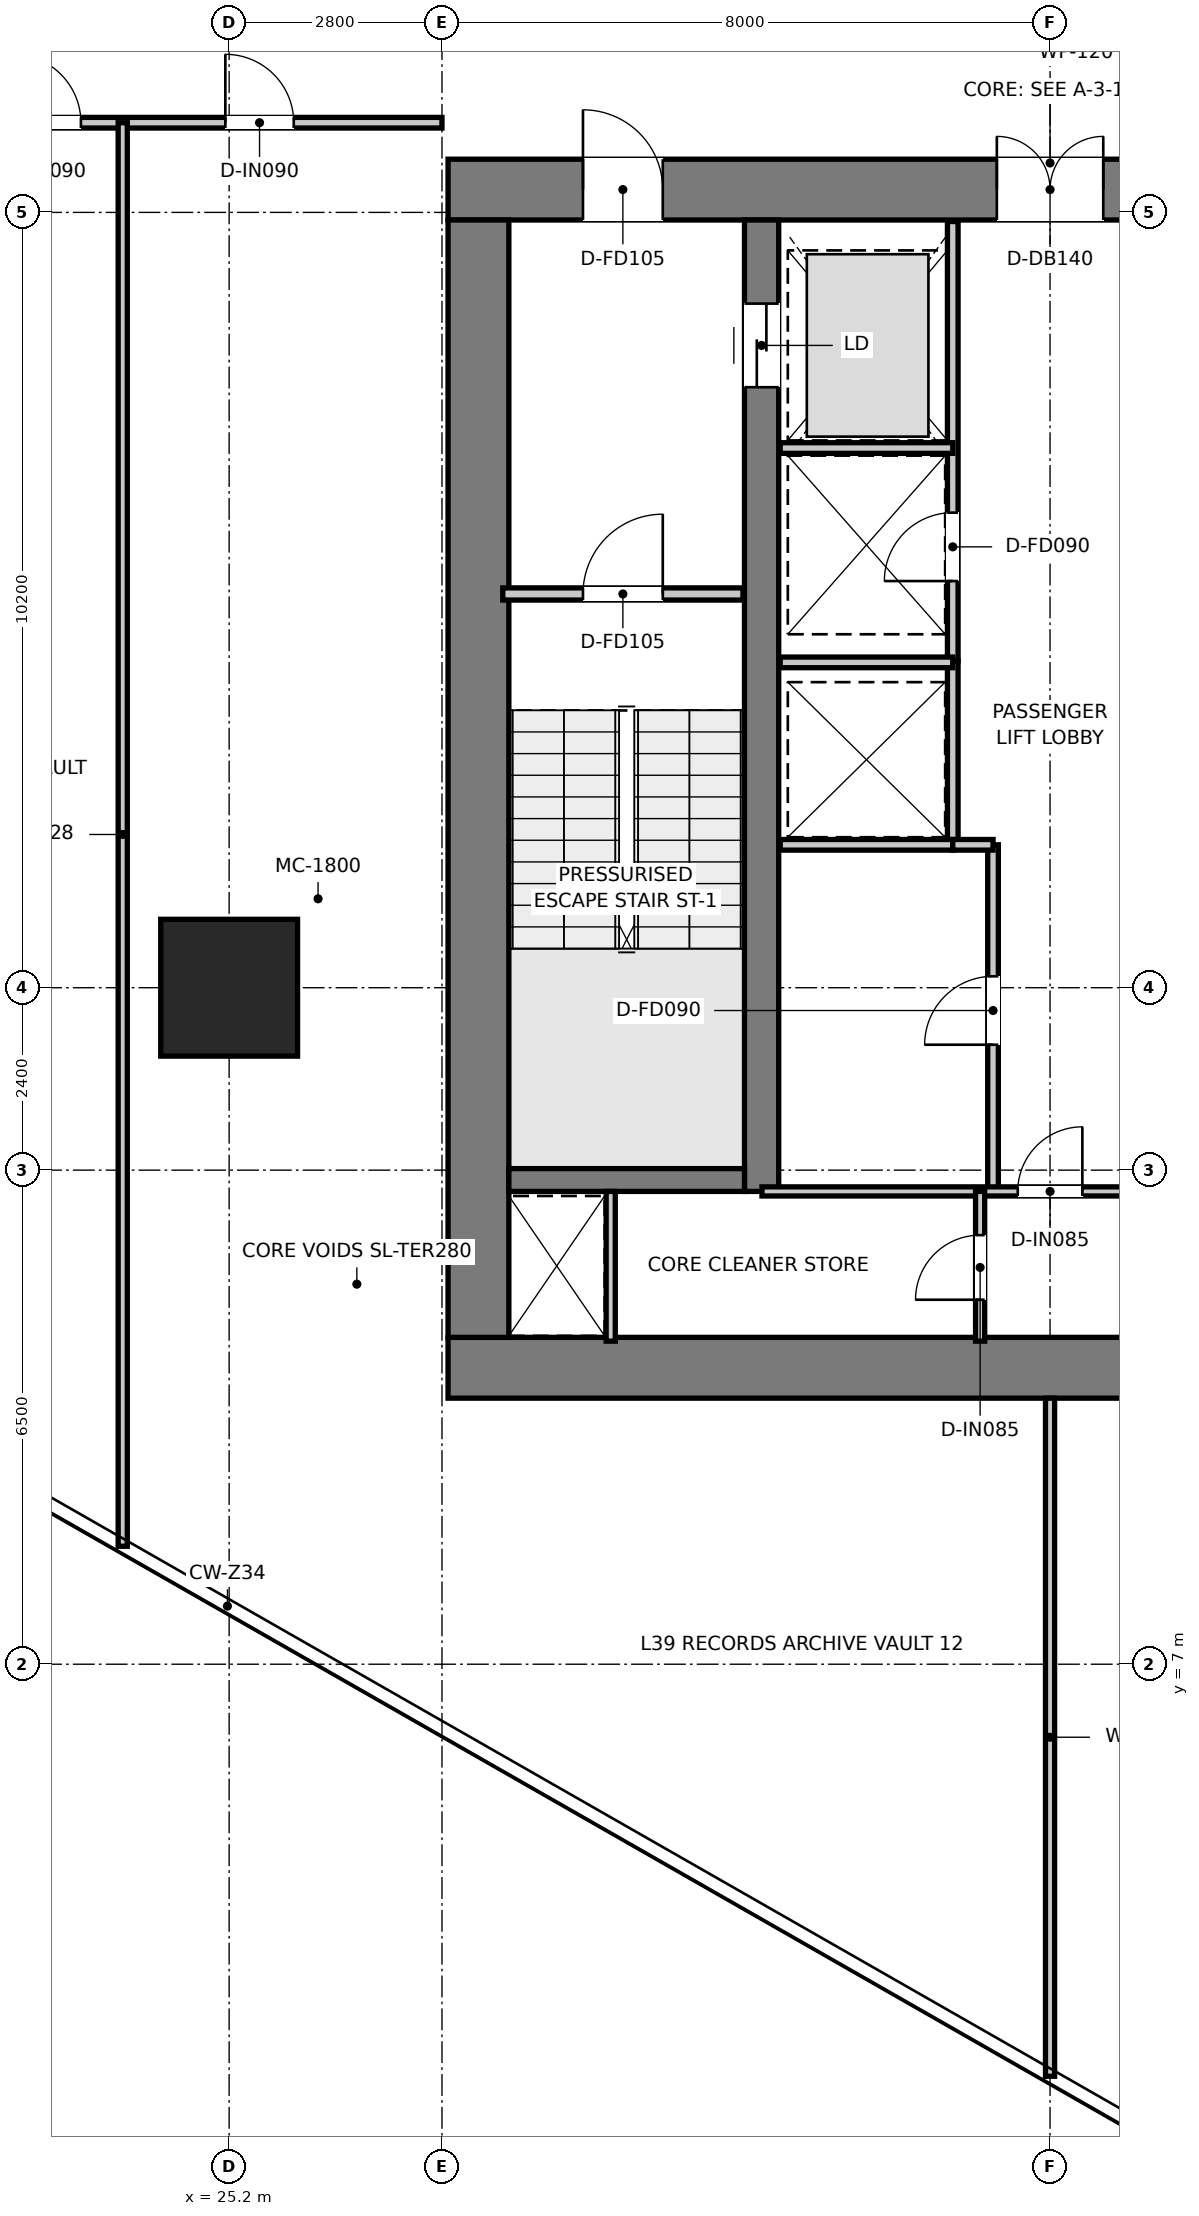
"""IFC4 building model, lengths in metres.
Left out: names, types, materials, properties, quantities, classifications, styles, units other than length and angle.
Written with IfcOpenShell. Run it as: python <this file> out.ifc"""

import sys

from ifc_helpers import new_model, si_unit, direction, frame, frame_2d, origin, origin_2d, place, context, subcontext, project, spatial, rectangle, extrude, source, transform, mapped, element, fill, save


model = new_model("IFC4")
c1 = context("Model", 3, precision=1e-05, world=origin(), true_north=direction((0.0, 1.0)))
c2 = subcontext(c1, "Body", "Model", "MODEL_VIEW")
j1 = project(units=[si_unit("LENGTHUNIT", "METRE"), si_unit("PLANEANGLEUNIT", "RADIAN")], contexts=[c1])
p1 = place(None, origin())
s1 = spatial("IfcSite", under=j1, at=p1, CompositionType="ELEMENT")
p2 = place(p1, origin())
s2 = spatial("IfcBuilding", under=s1, at=p2, CompositionType="ELEMENT")
p3 = place(p2, frame((0.0, 0.0, 162.0)))
s3 = spatial("IfcBuildingStorey", under=s2, at=p3, CompositionType="ELEMENT", Elevation=162.0)
p4 = place(p3, frame((28.08, 10.9, 0.0), z_axis=(0.0, 0.0, 1.0), x_axis=(1.0, 0.0, 0.0)))
e1 = element("IfcWall", 1, at=p4, inside=s3, PredefinedType="SHEAR", context=c2, shape_type="SweptSolid", body=[
    extrude(rectangle(XDim=15.84, YDim=0.8, at=frame_2d((7.92, 0.0))), origin(), (0.0, 0.0, 1.0), 3.95),
])
p5 = place(p3, frame((28.08, 26.4, 0.0), z_axis=(0.0, 0.0, 1.0), x_axis=(1.0, 0.0, 0.0)))
e2 = element("IfcWall", 2, at=p5, inside=s3, PredefinedType="SHEAR", context=c2, shape_type="SweptSolid", body=[
    extrude(rectangle(XDim=15.84, YDim=0.8, at=frame_2d((7.92, 0.0))), origin(), (0.0, 0.0, 1.0), 3.95),
])
p6 = place(p5, frame((7.22, 0.0, 0.0)))
e3 = element("IfcOpeningElement", 3, at=p6, cuts=e2, PredefinedType="OPENING", context=c2, shape_type="SweptSolid", body=[
    extrude(rectangle(XDim=1.4, YDim=2.2, at=frame_2d((0.7, 1.1))), frame((0.0, 0.41, 0.0), z_axis=(0.0, -1.0, 0.0), x_axis=(1.0, 0.0, 0.0)), (0.0, 0.0, 1.0), 0.82),
])
p7 = place(p5, frame((1.775, 0.0, 0.0)))
e4 = element("IfcOpeningElement", 4, at=p7, cuts=e2, PredefinedType="OPENING", context=c2, shape_type="SweptSolid", body=[
    extrude(rectangle(XDim=1.05, YDim=2.1, at=frame_2d((0.525, 1.05))), frame((0.0, 0.41, 0.0), z_axis=(0.0, -1.0, 0.0), x_axis=(1.0, 0.0, 0.0)), (0.0, 0.0, 1.0), 0.82),
])
p8 = place(p5, frame((13.015, 0.0, 0.0)))
e5 = element("IfcOpeningElement", 5, at=p8, cuts=e2, PredefinedType="OPENING", context=c2, shape_type="SweptSolid", body=[
    extrude(rectangle(XDim=1.05, YDim=2.1, at=frame_2d((0.525, 1.05))), frame((0.0, 0.41, 0.0), z_axis=(0.0, -1.0, 0.0), x_axis=(1.0, 0.0, 0.0)), (0.0, 0.0, 1.0), 0.82),
])
p9 = place(p3, frame((28.48, 11.3, 0.0), z_axis=(0.0, 0.0, 1.0), x_axis=(0.0, 1.0, 0.0)))
e6 = element("IfcWall", 6, at=p9, inside=s3, PredefinedType="SHEAR", context=c2, shape_type="SweptSolid", body=[
    extrude(rectangle(XDim=14.7, YDim=0.8, at=frame_2d((7.35, 0.0))), origin(), (0.0, 0.0, 1.0), 3.95),
])
p10 = place(p3, frame((32.205, 13.22, 0.0), z_axis=(0.0, 0.0, 1.0), x_axis=(0.0, 1.0, 0.0)))
e7 = element("IfcWall", 7, at=p10, inside=s3, PredefinedType="SHEAR", context=c2, shape_type="SweptSolid", body=[
    extrude(rectangle(XDim=12.78, YDim=0.45, at=frame_2d((6.39, 0.0))), origin(), (0.0, 0.0, 1.0), 3.95),
])
p11 = place(p10, frame((10.58, 0.0, 0.0)))
e8 = element("IfcOpeningElement", 8, at=p11, cuts=e7, PredefinedType="OPENING", context=c2, shape_type="SweptSolid", body=[
    extrude(rectangle(XDim=1.1, YDim=2.15, at=frame_2d((0.55, 1.075))), frame((0.0, 0.235, 0.0), z_axis=(0.0, -1.0, 0.0), x_axis=(1.0, 0.0, 0.0)), (0.0, 0.0, 1.0), 0.47),
])
p12 = place(p3, frame((28.88, 13.37, 0.0), z_axis=(0.0, 0.0, 1.0), x_axis=(1.0, 0.0, 0.0)))
e9 = element("IfcWall", 9, at=p12, inside=s3, PredefinedType="SHEAR", context=c2, shape_type="SweptSolid", body=[
    extrude(rectangle(XDim=3.1, YDim=0.3, at=frame_2d((1.55, 0.0))), origin(), (0.0, 0.0, 1.0), 3.95),
])
m1 = source(origin(), c2, "Body", "SweptSolid", [
    extrude(rectangle(XDim=1.8, YDim=1.8, at=origin_2d()), origin(), (0.0, 0.0, 1.0), 3.95),
])
p13 = place(p3, frame((25.2, 15.9, 0.0), z_axis=(0.0, 0.0, 1.0), x_axis=(1.0, 0.0, 0.0)))
e10 = element("IfcColumn", 10, at=p13, inside=s3, PredefinedType="USERDEFINED", context=c2, shape_type="MappedRepresentation", body=[
    mapped(m1, transform((0.0, 0.0, 0.0), x_axis=(1.0, 0.0, 0.0), y_axis=(0.0, 1.0, 0.0), z_axis=(0.0, 0.0, 1.0), scale=1.0)),
])
p14 = place(p3, frame((28.8, 21.08, 0.0), z_axis=(0.0, 0.0, 1.0), x_axis=(1.0, 0.0, 0.0)))
e11 = element("IfcWall", 11, at=p14, inside=s3, PredefinedType="PARTITIONING", context=c2, shape_type="SweptSolid", body=[
    extrude(rectangle(XDim=3.16, YDim=0.16, at=frame_2d((1.58, 0.0))), origin(), (0.0, 0.0, 1.0), 3.67),
])
p15 = place(p14, frame((1.055, 0.0, 0.0)))
e12 = element("IfcOpeningElement", 12, at=p15, cuts=e11, PredefinedType="OPENING", context=c2, shape_type="SweptSolid", body=[
    extrude(rectangle(XDim=1.05, YDim=2.1, at=frame_2d((0.525, 1.05))), frame((0.0, 0.09, 0.0), z_axis=(0.0, -1.0, 0.0), x_axis=(1.0, 0.0, 0.0)), (0.0, 0.0, 1.0), 0.18),
])
p16 = place(p3, frame((34.72, 20.2, 0.0), z_axis=(0.0, 0.0, 1.0), x_axis=(0.0, 1.0, 0.0)))
e13 = element("IfcWall", 13, at=p16, inside=s3, PredefinedType="PARTITIONING", context=c2, shape_type="SweptSolid", body=[
    extrude(rectangle(XDim=5.78, YDim=0.14, at=frame_2d((2.89, 0.0))), origin(), (0.0, 0.0, 1.0), 2.67),
])
p17 = place(p16, frame((1.05, 0.0, 0.0)))
e14 = element("IfcOpeningElement", 14, at=p17, cuts=e13, PredefinedType="OPENING", context=c2, shape_type="SweptSolid", body=[
    extrude(rectangle(XDim=0.9, YDim=2.1, at=frame_2d((0.45, 1.05))), frame((0.0, 0.08, 0.0), z_axis=(0.0, -1.0, 0.0), x_axis=(1.0, 0.0, 0.0)), (0.0, 0.0, 1.0), 0.16),
])
p18 = place(p3, frame((32.45, 23.0, 0.0), z_axis=(0.0, 0.0, 1.0), x_axis=(1.0, 0.0, 0.0)))
e15 = element("IfcWall", 15, at=p18, inside=s3, PredefinedType="PARTITIONING", context=c2, shape_type="SweptSolid", body=[
    extrude(rectangle(XDim=2.27, YDim=0.14, at=frame_2d((1.135, 0.0))), origin(), (0.0, 0.0, 1.0), 2.67),
])
p19 = place(p3, frame((34.72, 17.78, 0.0), z_axis=(0.0, 0.0, 1.0), x_axis=(0.0, 1.0, 0.0)))
e16 = element("IfcWall", 16, at=p19, inside=s3, PredefinedType="PARTITIONING", context=c2, shape_type="SweptSolid", body=[
    extrude(rectangle(XDim=2.42, YDim=0.14, at=frame_2d((1.21, 0.0))), origin(), (0.0, 0.0, 1.0), 3.67),
])
for number, where, z_axis, x_axis in (
    (17, (32.45, 17.78, 0.0), (0.0, 0.0, 1.0), (1.0, 0.0, 0.0)),
    (18, (32.45, 20.18, 0.0), (0.0, 0.0, 1.0), (1.0, 0.0, 0.0)),
):
    element("IfcWall", number, at=place(p3, frame(where, z_axis=z_axis, x_axis=x_axis)), inside=s3, PredefinedType="PARTITIONING", context=c2, shape_type="SweptSolid", body=[
        extrude(rectangle(XDim=2.27, YDim=0.14, at=frame_2d((1.135, 0.0))), origin(), (0.0, 0.0, 1.0), 3.67),
    ])
p20 = place(p3, frame((35.25, 13.22, 0.0), z_axis=(0.0, 0.0, 1.0), x_axis=(0.0, 1.0, 0.0)))
e19 = element("IfcWall", 19, at=p20, inside=s3, PredefinedType="PARTITIONING", context=c2, shape_type="SweptSolid", body=[
    extrude(rectangle(XDim=4.56, YDim=0.14, at=frame_2d((2.28, 0.0))), origin(), (0.0, 0.0, 1.0), 3.67),
])
p21 = place(p20, frame((1.93, 0.0, 0.0)))
e20 = element("IfcOpeningElement", 20, at=p21, cuts=e19, PredefinedType="OPENING", context=c2, shape_type="SweptSolid", body=[
    extrude(rectangle(XDim=0.9, YDim=2.1, at=frame_2d((0.45, 1.05))), frame((0.0, 0.08, 0.0), z_axis=(0.0, -1.0, 0.0), x_axis=(1.0, 0.0, 0.0)), (0.0, 0.0, 1.0), 0.16),
])
p22 = place(p3, frame((34.72, 17.78, 0.0), z_axis=(0.0, 0.0, 1.0), x_axis=(1.0, 0.0, 0.0)))
e21 = element("IfcWall", 21, at=p22, inside=s3, PredefinedType="PARTITIONING", context=c2, shape_type="SweptSolid", body=[
    extrude(rectangle(XDim=0.53, YDim=0.14, at=frame_2d((0.265, 0.0))), origin(), (0.0, 0.0, 1.0), 3.67),
])
p23 = place(p3, frame((30.22, 11.25, 0.0), z_axis=(0.0, 0.0, 1.0), x_axis=(0.0, 1.0, 0.0)))
e22 = element("IfcWall", 22, at=p23, inside=s3, PredefinedType="PARTITIONING", context=c2, shape_type="SweptSolid", body=[
    extrude(rectangle(XDim=1.97, YDim=0.12, at=frame_2d((0.985, 0.0))), origin(), (0.0, 0.0, 1.0), 3.67),
])
p24 = place(p3, frame((32.21, 13.22, 0.0), z_axis=(0.0, 0.0, 1.0), x_axis=(1.0, 0.0, 0.0)))
e23 = element("IfcWall", 23, at=p24, inside=s3, PredefinedType="PARTITIONING", context=c2, shape_type="SweptSolid", body=[
    extrude(rectangle(XDim=7.58, YDim=0.12, at=frame_2d((3.79, 0.0))), origin(), (0.0, 0.0, 1.0), 3.67),
])
p25 = place(p24, frame((3.365, 0.0, 0.0)))
e24 = element("IfcOpeningElement", 24, at=p25, cuts=e23, PredefinedType="OPENING", context=c2, shape_type="SweptSolid", body=[
    extrude(rectangle(XDim=0.85, YDim=2.1, at=frame_2d((0.425, 1.05))), frame((0.0, 0.07, 0.0), z_axis=(0.0, -1.0, 0.0), x_axis=(1.0, 0.0, 0.0)), (0.0, 0.0, 1.0), 0.14),
])
p26 = place(p3, frame((35.08, 11.25, 0.0), z_axis=(0.0, 0.0, 1.0), x_axis=(0.0, 1.0, 0.0)))
e25 = element("IfcWall", 25, at=p26, inside=s3, PredefinedType="PARTITIONING", context=c2, shape_type="SweptSolid", body=[
    extrude(rectangle(XDim=1.97, YDim=0.12, at=frame_2d((0.985, 0.0))), origin(), (0.0, 0.0, 1.0), 3.67),
])
p27 = place(p26, frame((0.545, 0.0, 0.0)))
e26 = element("IfcOpeningElement", 26, at=p27, cuts=e25, PredefinedType="OPENING", context=c2, shape_type="SweptSolid", body=[
    extrude(rectangle(XDim=0.85, YDim=2.1, at=frame_2d((0.425, 1.05))), frame((0.0, 0.07, 0.0), z_axis=(0.0, -1.0, 0.0), x_axis=(1.0, 0.0, 0.0)), (0.0, 0.0, 1.0), 0.14),
])
p28 = place(p3, frame((11.21, 27.28, 0.0), z_axis=(0.0, 0.0, 1.0), x_axis=(1.0, 0.0, 0.0)))
e27 = element("IfcWall", 27, at=p28, inside=s3, PredefinedType="PARTITIONING", context=c2, shape_type="SweptSolid", body=[
    extrude(rectangle(XDim=16.79, YDim=0.14, at=frame_2d((8.395, 0.0))), origin(), (0.0, 0.0, 1.0), 3.03),
])
p29 = place(p28, frame((2.565, 0.0, 0.0)))
e28 = element("IfcOpeningElement", 28, at=p29, cuts=e27, PredefinedType="OPENING", context=c2, shape_type="SweptSolid", body=[
    extrude(rectangle(XDim=0.9, YDim=2.1, at=frame_2d((0.45, 1.05))), frame((0.0, 0.08, 0.0), z_axis=(0.0, -1.0, 0.0), x_axis=(1.0, 0.0, 0.0)), (0.0, 0.0, 1.0), 0.16),
])
p30 = place(p28, frame((11.139, 0.0, 0.0)))
e29 = element("IfcOpeningElement", 29, at=p30, cuts=e27, PredefinedType="OPENING", context=c2, shape_type="SweptSolid", body=[
    extrude(rectangle(XDim=0.9, YDim=2.1, at=frame_2d((0.45, 1.05))), frame((0.0, 0.08, 0.0), z_axis=(0.0, -1.0, 0.0), x_axis=(1.0, 0.0, 0.0)), (0.0, 0.0, 1.0), 0.16),
])
p31 = place(p28, frame((13.939, 0.0, 0.0)))
e30 = element("IfcOpeningElement", 30, at=p31, cuts=e27, PredefinedType="OPENING", context=c2, shape_type="SweptSolid", body=[
    extrude(rectangle(XDim=0.9, YDim=2.1, at=frame_2d((0.45, 1.05))), frame((0.0, 0.08, 0.0), z_axis=(0.0, -1.0, 0.0), x_axis=(1.0, 0.0, 0.0)), (0.0, 0.0, 1.0), 0.16),
])
p32 = place(p3, frame((36.0, 1.579, 0.0), z_axis=(0.0, 0.0, 1.0), x_axis=(0.0, 1.0, 0.0)))
e31 = element("IfcWall", 31, at=p32, inside=s3, PredefinedType="PARTITIONING", context=c2, shape_type="SweptSolid", body=[
    extrude(rectangle(XDim=8.921, YDim=0.12, at=frame_2d((4.46, 0.0))), origin(), (0.0, 0.0, 1.0), 3.67),
])
p33 = place(p3, frame((23.8, 8.552, 0.0), z_axis=(0.0, 0.0, 1.0), x_axis=(0.0, 1.0, 0.0)))
e32 = element("IfcWall", 32, at=p33, inside=s3, PredefinedType="PARTITIONING", context=c2, shape_type="SweptSolid", body=[
    extrude(rectangle(XDim=18.728, YDim=0.12, at=frame_2d((9.364, 0.0))), origin(), (0.0, 0.0, 1.0), 3.08),
])
p34 = place(p15, origin())
e33 = element("IfcDoor", 33, at=p34, inside=s3, OperationType="SINGLE_SWING_RIGHT", PredefinedType="DOOR", context=c2, shape_type="SweptSolid", body=[
    extrude(rectangle(XDim=1.05, YDim=2.1, at=frame_2d((0.525, 1.05))), frame((0.0, 0.025, 0.0), z_axis=(0.0, -1.0, 0.0), x_axis=(1.0, 0.0, 0.0)), (0.0, 0.0, 1.0), 0.05),
])
fill(e12, e33)
p35 = place(p6, origin())
e34 = element("IfcDoor", 34, at=p35, inside=s3, OperationType="DOUBLE_DOOR_SINGLE_SWING", PredefinedType="DOOR", context=c2, shape_type="SweptSolid", body=[
    extrude(rectangle(XDim=1.4, YDim=2.2, at=frame_2d((0.7, 1.1))), frame((0.0, 0.025, 0.0), z_axis=(0.0, -1.0, 0.0), x_axis=(1.0, 0.0, 0.0)), (0.0, 0.0, 1.0), 0.05),
])
fill(e3, e34)
p36 = place(p7, origin())
e35 = element("IfcDoor", 35, at=p36, inside=s3, OperationType="SINGLE_SWING_LEFT", PredefinedType="DOOR", context=c2, shape_type="SweptSolid", body=[
    extrude(rectangle(XDim=1.05, YDim=2.1, at=frame_2d((0.525, 1.05))), frame((0.0, 0.025, 0.0), z_axis=(0.0, -1.0, 0.0), x_axis=(1.0, 0.0, 0.0)), (0.0, 0.0, 1.0), 0.05),
])
fill(e4, e35)
p37 = place(p11, origin())
e36 = element("IfcDoor", 36, at=p37, inside=s3, OperationType="DOUBLE_DOOR_SLIDING", PredefinedType="DOOR", context=c2, shape_type="SweptSolid", body=[
    extrude(rectangle(XDim=1.1, YDim=2.15, at=frame_2d((0.55, 1.075))), frame((0.0, 0.025, 0.0), z_axis=(0.0, -1.0, 0.0), x_axis=(1.0, 0.0, 0.0)), (0.0, 0.0, 1.0), 0.05),
])
fill(e8, e36)
p38 = place(p17, origin())
e37 = element("IfcDoor", 37, at=p38, inside=s3, OperationType="SINGLE_SWING_LEFT", PredefinedType="DOOR", context=c2, shape_type="SweptSolid", body=[
    extrude(rectangle(XDim=0.9, YDim=2.1, at=frame_2d((0.45, 1.05))), frame((0.0, 0.025, 0.0), z_axis=(0.0, -1.0, 0.0), x_axis=(1.0, 0.0, 0.0)), (0.0, 0.0, 1.0), 0.05),
])
fill(e14, e37)
p39 = place(p21, origin())
e38 = element("IfcDoor", 38, at=p39, inside=s3, OperationType="SINGLE_SWING_LEFT", PredefinedType="DOOR", context=c2, shape_type="SweptSolid", body=[
    extrude(rectangle(XDim=0.9, YDim=2.1, at=frame_2d((0.45, 1.05))), frame((0.0, 0.025, 0.0), z_axis=(0.0, -1.0, 0.0), x_axis=(1.0, 0.0, 0.0)), (0.0, 0.0, 1.0), 0.05),
])
fill(e20, e38)
p40 = place(p25, origin())
e39 = element("IfcDoor", 39, at=p40, inside=s3, OperationType="SINGLE_SWING_RIGHT", PredefinedType="DOOR", context=c2, shape_type="SweptSolid", body=[
    extrude(rectangle(XDim=0.85, YDim=2.1, at=frame_2d((0.425, 1.05))), frame((0.0, 0.025, 0.0), z_axis=(0.0, -1.0, 0.0), x_axis=(1.0, 0.0, 0.0)), (0.0, 0.0, 1.0), 0.05),
])
fill(e24, e39)
p41 = place(p27, origin())
e40 = element("IfcDoor", 40, at=p41, inside=s3, OperationType="SINGLE_SWING_LEFT", PredefinedType="DOOR", context=c2, shape_type="SweptSolid", body=[
    extrude(rectangle(XDim=0.85, YDim=2.1, at=frame_2d((0.425, 1.05))), frame((0.0, 0.025, 0.0), z_axis=(0.0, -1.0, 0.0), x_axis=(1.0, 0.0, 0.0)), (0.0, 0.0, 1.0), 0.05),
])
fill(e26, e40)
p42 = place(p30, origin())
e41 = element("IfcDoor", 41, at=p42, inside=s3, OperationType="SINGLE_SWING_LEFT", PredefinedType="DOOR", context=c2, shape_type="SweptSolid", body=[
    extrude(rectangle(XDim=0.9, YDim=2.1, at=frame_2d((0.45, 1.05))), frame((0.0, 0.025, 0.0), z_axis=(0.0, -1.0, 0.0), x_axis=(1.0, 0.0, 0.0)), (0.0, 0.0, 1.0), 0.05),
])
fill(e29, e41)
p43 = place(p31, origin())
e42 = element("IfcDoor", 42, at=p43, inside=s3, OperationType="SINGLE_SWING_LEFT", PredefinedType="DOOR", context=c2, shape_type="SweptSolid", body=[
    extrude(rectangle(XDim=0.9, YDim=2.1, at=frame_2d((0.45, 1.05))), frame((0.0, 0.025, 0.0), z_axis=(0.0, -1.0, 0.0), x_axis=(1.0, 0.0, 0.0)), (0.0, 0.0, 1.0), 0.05),
])
fill(e30, e42)
save(model, sys.argv[1])
